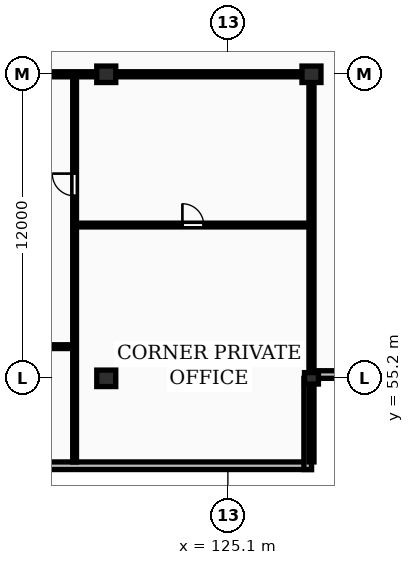
"""IFC4 building model, lengths in metres.
Left out: names, types, materials, properties, quantities, classifications, styles, units other than length and angle.
Written with IfcOpenShell. Run it as: python <this file> out.ifc"""

import sys

from ifc_helpers import new_model, si_unit, direction, frame, frame_2d, origin, origin_2d, place, context, subcontext, project, spatial, rectangle, extrude, element, fill, save


model = new_model("IFC4")
c1 = context("Model", 3, precision=1e-05, world=origin(), true_north=direction((0.0, 1.0)))
c2 = subcontext(c1, "Body", "Model", "MODEL_VIEW")
j1 = project(units=[si_unit("LENGTHUNIT", "METRE"), si_unit("PLANEANGLEUNIT", "RADIAN")], contexts=[c1])
p1 = place(None, origin())
s1 = spatial("IfcSite", under=j1, at=p1, CompositionType="ELEMENT")
p2 = place(p1, origin())
s2 = spatial("IfcBuilding", under=s1, at=p2, CompositionType="ELEMENT")
p3 = place(p2, frame((0.0, 0.0, 249.35)))
s3 = spatial("IfcBuildingStorey", under=s2, at=p3, CompositionType="ELEMENT", Elevation=249.35)
for number, where, z_axis, x_axis in (
    (1, (120.3, 55.2, 0.0), (0.0, 0.0, 1.0), (1.0, 0.0, 0.0)),
    (2, (120.3, 67.2, 0.0), (0.0, 0.0, 1.0), (1.0, 0.0, 0.0)),
):
    element("IfcColumn", number, at=place(p3, frame(where, z_axis=z_axis, x_axis=x_axis)), inside=s3, PredefinedType="COLUMN", context=c2, shape_type="SweptSolid", body=[
        extrude(rectangle(XDim=0.75, YDim=0.65, at=origin_2d()), origin(), (0.0, 0.0, 1.0), 3.45),
    ])
p4 = place(p3, frame((128.4, 55.2, 0.0), z_axis=(0.0, 0.0, 1.0), x_axis=(1.0, 0.0, 0.0)))
e3 = element("IfcColumn", 3, at=p4, inside=s3, PredefinedType="PILASTER", context=c2, shape_type="SweptSolid", body=[
    extrude(rectangle(XDim=0.55, YDim=0.45, at=origin_2d()), origin(), (0.0, 0.0, 1.0), 3.45),
])
p5 = place(p3, frame((128.4, 67.2, 0.0), z_axis=(0.0, 0.0, 1.0), x_axis=(1.0, 0.0, 0.0)))
e4 = element("IfcColumn", 4, at=p5, inside=s3, PredefinedType="COLUMN", context=c2, shape_type="SweptSolid", body=[
    extrude(rectangle(XDim=0.75, YDim=0.65, at=origin_2d()), origin(), (0.0, 0.0, 1.0), 3.45),
])
p6 = place(p3, frame((59.8, 51.75, 0.0), z_axis=(0.0, 0.0, 1.0), x_axis=(1.0, 0.0, 0.0)))
e5 = element("IfcWall", 5, at=p6, inside=s3, PredefinedType="STANDARD", context=c2, shape_type="SweptSolid", body=[
    extrude(rectangle(XDim=68.6, YDim=0.3, at=frame_2d((34.3, 0.0))), origin(), (0.0, 0.0, 1.0), 3.17),
])
p7 = place(p6, frame((13.025, 0.0, 0.85)))
e6 = element("IfcOpeningElement", 6, at=p7, cuts=e5, PredefinedType="OPENING", context=c2, shape_type="SweptSolid", body=[
    extrude(rectangle(XDim=1.8, YDim=1.8, at=frame_2d((0.9, 0.9))), frame((0.0, 0.16, 0.0), z_axis=(0.0, -1.0, 0.0), x_axis=(1.0, 0.0, 0.0)), (0.0, 0.0, 1.0), 0.32),
])
p8 = place(p6, frame((56.375, 0.0, 0.85)))
e7 = element("IfcOpeningElement", 7, at=p8, cuts=e5, PredefinedType="OPENING", context=c2, shape_type="SweptSolid", body=[
    extrude(rectangle(XDim=1.8, YDim=1.8, at=frame_2d((0.9, 0.9))), frame((0.0, 0.16, 0.0), z_axis=(0.0, -1.0, 0.0), x_axis=(1.0, 0.0, 0.0)), (0.0, 0.0, 1.0), 0.32),
])
p9 = place(p3, frame((128.25, 51.6, 0.0), z_axis=(0.0, 0.0, 1.0), x_axis=(0.0, 1.0, 0.0)))
e8 = element("IfcWall", 8, at=p9, inside=s3, PredefinedType="STANDARD", context=c2, shape_type="SweptSolid", body=[
    extrude(rectangle(XDim=3.6, YDim=0.3, at=frame_2d((1.8, 0.0))), origin(), (0.0, 0.0, 1.0), 3.17),
])
p10 = place(p3, frame((128.4, 55.35, 0.0), z_axis=(0.0, 0.0, 1.0), x_axis=(1.0, 0.0, 0.0)))
e9 = element("IfcWall", 9, at=p10, inside=s3, PredefinedType="STANDARD", context=c2, shape_type="SweptSolid", body=[
    extrude(rectangle(XDim=3.6, YDim=0.3, at=frame_2d((1.8, 0.0))), origin(), (0.0, 0.0, 1.0), 3.17),
])
p11 = place(p3, frame((128.4, 51.9, 0.0), z_axis=(0.0, 0.0, 1.0), x_axis=(0.0, 1.0, 0.0)))
e10 = element("IfcWall", 10, at=p11, inside=s3, PredefinedType="PARTITIONING", context=c2, shape_type="SweptSolid", body=[
    extrude(rectangle(XDim=15.3, YDim=0.2, at=frame_2d((7.65, 0.0))), origin(), (0.0, 0.0, 1.0), 2.477),
])
p12 = place(p3, frame((119.05, 61.25, 0.0), z_axis=(0.0, 0.0, 1.0), x_axis=(1.0, 0.0, 0.0)))
e11 = element("IfcWall", 11, at=p12, inside=s3, PredefinedType="PARTITIONING", context=c2, shape_type="SweptSolid", body=[
    extrude(rectangle(XDim=9.35, YDim=0.15, at=frame_2d((4.675, 0.0))), origin(), (0.0, 0.0, 1.0), 3.17),
])
p13 = place(p12, frame((4.255, 0.0, 0.0)))
e12 = element("IfcOpeningElement", 12, at=p13, cuts=e11, PredefinedType="OPENING", context=c2, shape_type="SweptSolid", body=[
    extrude(rectangle(XDim=0.84, YDim=2.04, at=frame_2d((0.42, 1.02))), frame((0.0, 0.085, 0.0), z_axis=(0.0, -1.0, 0.0), x_axis=(1.0, 0.0, 0.0)), (0.0, 0.0, 1.0), 0.17),
])
p14 = place(p3, frame((119.05, 51.9, 0.0), z_axis=(0.0, 0.0, 1.0), x_axis=(0.0, 1.0, 0.0)))
e13 = element("IfcWall", 13, at=p14, inside=s3, PredefinedType="PARTITIONING", context=c2, shape_type="SweptSolid", body=[
    extrude(rectangle(XDim=15.25, YDim=0.15, at=frame_2d((7.625, 0.0))), origin(), (0.0, 0.0, 1.0), 3.17),
])
p15 = place(p14, frame((10.5, 0.0, 0.0)))
e14 = element("IfcOpeningElement", 14, at=p15, cuts=e13, PredefinedType="OPENING", context=c2, shape_type="SweptSolid", body=[
    extrude(rectangle(XDim=0.88, YDim=2.06, at=frame_2d((0.44, 1.03))), frame((0.0, 0.085, 0.0), z_axis=(0.0, -1.0, 0.0), x_axis=(1.0, 0.0, 0.0)), (0.0, 0.0, 1.0), 0.17),
])
p16 = place(p3, frame((112.27, 56.45, 0.0), z_axis=(0.0, 0.0, 1.0), x_axis=(1.0, 0.0, 0.0)))
e15 = element("IfcWall", 15, at=p16, inside=s3, PredefinedType="PARTITIONING", context=c2, shape_type="SweptSolid", body=[
    extrude(rectangle(XDim=6.76, YDim=0.15, at=frame_2d((3.38, 0.0))), origin(), (0.0, 0.0, 1.0), 3.17),
])
p17 = place(p16, frame((1.64, 0.0, 0.0)))
e16 = element("IfcOpeningElement", 16, at=p17, cuts=e15, PredefinedType="OPENING", context=c2, shape_type="SweptSolid", body=[
    extrude(rectangle(XDim=0.84, YDim=2.04, at=frame_2d((0.42, 1.02))), frame((0.0, 0.085, 0.0), z_axis=(0.0, -1.0, 0.0), x_axis=(1.0, 0.0, 0.0)), (0.0, 0.0, 1.0), 0.17),
])
p18 = place(p16, frame((3.16, 0.0, 0.0)))
e17 = element("IfcOpeningElement", 17, at=p18, cuts=e15, PredefinedType="OPENING", context=c2, shape_type="SweptSolid", body=[
    extrude(rectangle(XDim=0.88, YDim=2.06, at=frame_2d((0.44, 1.03))), frame((0.0, 0.085, 0.0), z_axis=(0.0, -1.0, 0.0), x_axis=(1.0, 0.0, 0.0)), (0.0, 0.0, 1.0), 0.17),
])
p19 = place(p3, frame((112.25, 67.2, 0.0), z_axis=(0.0, 0.0, 1.0), x_axis=(1.0, 0.0, 0.0)))
e18 = element("IfcWall", 18, at=p19, inside=s3, PredefinedType="PARTITIONING", context=c2, shape_type="SweptSolid", body=[
    extrude(rectangle(XDim=16.15, YDim=0.2, at=frame_2d((8.075, 0.0))), origin(), (0.0, 0.0, 1.0), 2.633),
])
p20 = place(p19, frame((1.58, 0.0, 0.0)))
e19 = element("IfcOpeningElement", 19, at=p20, cuts=e18, PredefinedType="OPENING", context=c2, shape_type="SweptSolid", body=[
    extrude(rectangle(XDim=0.95, YDim=2.15, at=frame_2d((0.475, 1.075))), frame((0.0, 0.11, 0.0), z_axis=(0.0, -1.0, 0.0), x_axis=(1.0, 0.0, 0.0)), (0.0, 0.0, 1.0), 0.22),
])
p21 = place(p13, origin())
e20 = element("IfcDoor", 20, at=p21, inside=s3, OperationType="SINGLE_SWING_LEFT", PredefinedType="DOOR", context=c2, shape_type="SweptSolid", body=[
    extrude(rectangle(XDim=0.84, YDim=2.04, at=frame_2d((0.42, 1.02))), frame((0.0, 0.025, 0.0), z_axis=(0.0, -1.0, 0.0), x_axis=(1.0, 0.0, 0.0)), (0.0, 0.0, 1.0), 0.05),
])
fill(e12, e20)
p22 = place(p15, origin())
e21 = element("IfcDoor", 21, at=p22, inside=s3, OperationType="SINGLE_SWING_RIGHT", PredefinedType="DOOR", context=c2, shape_type="SweptSolid", body=[
    extrude(rectangle(XDim=0.88, YDim=2.06, at=frame_2d((0.44, 1.03))), frame((0.0, 0.025, 0.0), z_axis=(0.0, -1.0, 0.0), x_axis=(1.0, 0.0, 0.0)), (0.0, 0.0, 1.0), 0.05),
])
fill(e14, e21)
save(model, sys.argv[1])
